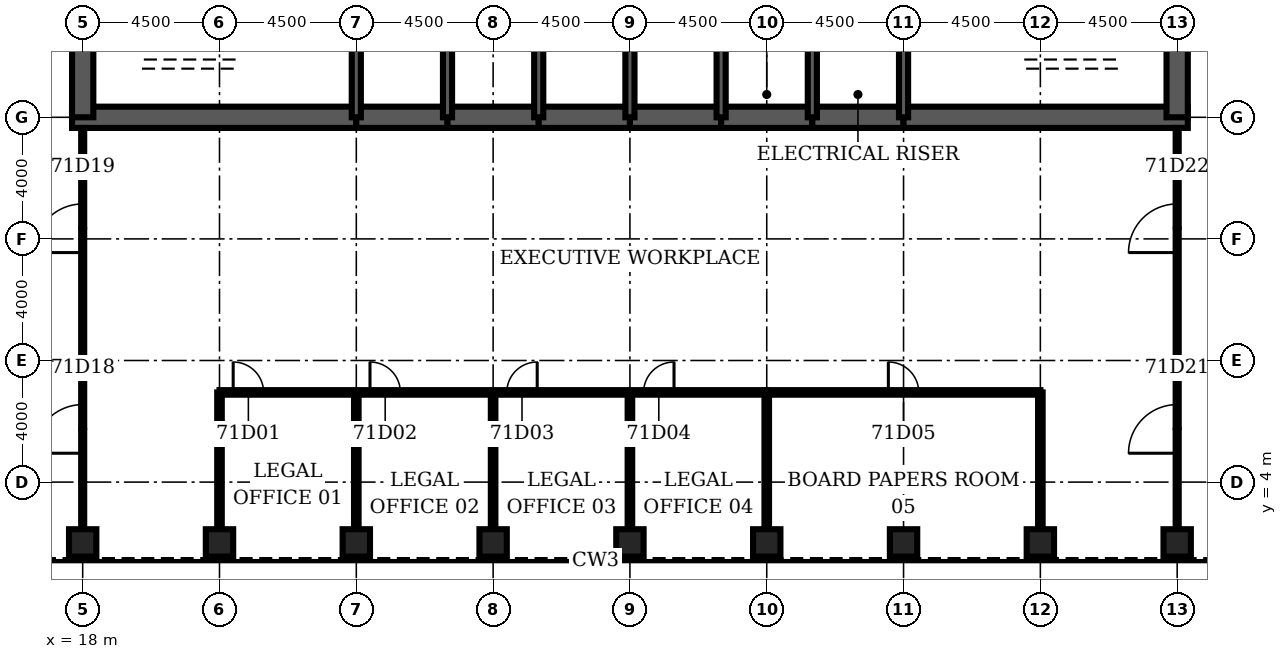
"""IFC4 building model, lengths in metres.
Left out: names, types, materials, properties, quantities, classifications, styles, units other than length and angle.
Written with IfcOpenShell. Run it as: python <this file> out.ifc"""

import sys

from ifc_helpers import new_model, si_unit, direction, frame, frame_2d, origin, origin_2d, place, context, subcontext, project, spatial, rectangle, hollow_rectangle, extrude, element, fill, save


model = new_model("IFC4")
c1 = context("Model", 3, precision=1e-05, world=origin(), true_north=direction((0.0, 1.0)))
c2 = subcontext(c1, "Body", "Model", "MODEL_VIEW")
j1 = project(units=[si_unit("LENGTHUNIT", "METRE"), si_unit("PLANEANGLEUNIT", "RADIAN")], contexts=[c1])
p1 = place(None, origin())
s1 = spatial("IfcSite", under=j1, at=p1, CompositionType="ELEMENT")
p2 = place(p1, origin())
s2 = spatial("IfcBuilding", under=s1, at=p2, CompositionType="ELEMENT")
p3 = place(p2, frame((0.0, 0.0, 313.1)))
s3 = spatial("IfcBuildingStorey", under=s2, at=p3, CompositionType="ELEMENT", Elevation=313.1)
for number, where, z_axis, x_axis in (
    (1, (18.0, 2.0, 0.0), (0.0, 0.0, 1.0), (0.0, 1.0, 0.0)),
    (2, (22.5, 2.0, 0.0), (0.0, 0.0, 1.0), (0.0, 1.0, 0.0)),
    (3, (27.0, 2.0, 0.0), (0.0, 0.0, 1.0), (0.0, 1.0, 0.0)),
    (4, (31.5, 2.0, 0.0), (0.0, 0.0, 1.0), (0.0, 1.0, 0.0)),
    (5, (36.0, 2.0, 0.0), (0.0, 0.0, 1.0), (0.0, 1.0, 0.0)),
    (6, (40.5, 2.0, 0.0), (0.0, 0.0, 1.0), (0.0, 1.0, 0.0)),
    (7, (45.0, 2.0, 0.0), (0.0, 0.0, 1.0), (0.0, 1.0, 0.0)),
    (8, (49.5, 2.0, 0.0), (0.0, 0.0, 1.0), (0.0, 1.0, 0.0)),
    (9, (54.0, 2.0, 0.0), (0.0, 0.0, 1.0), (0.0, 1.0, 0.0)),
):
    element("IfcColumn", number, at=place(p3, frame(where, z_axis=z_axis, x_axis=x_axis)), inside=s3, PredefinedType="COLUMN", context=c2, shape_type="SweptSolid", body=[
        extrude(hollow_rectangle(XDim=0.9, YDim=0.9, WallThickness=0.05, at=origin_2d()), origin(), (0.0, 0.0, 1.0), 4.2),
    ])
p4 = place(p3, frame((17.65, 16.0, 0.0), z_axis=(0.0, 0.0, 1.0), x_axis=(1.0, 0.0, 0.0)))
e10 = element("IfcWall", 10, at=p4, inside=s3, PredefinedType="SHEAR", context=c2, shape_type="SweptSolid", body=[
    extrude(rectangle(XDim=9.35, YDim=0.7, at=frame_2d((4.675, 0.0))), origin(), (0.0, 0.0, 1.0), 4.2),
])
for number, where, z_axis, x_axis in (
    (11, (27.0, 16.0, 0.0), (0.0, 0.0, 1.0), (1.0, 0.0, 0.0)),
    (12, (30.0, 16.0, 0.0), (0.0, 0.0, 1.0), (1.0, 0.0, 0.0)),
    (13, (33.0, 16.0, 0.0), (0.0, 0.0, 1.0), (1.0, 0.0, 0.0)),
    (14, (36.0, 16.0, 0.0), (0.0, 0.0, 1.0), (1.0, 0.0, 0.0)),
    (15, (39.0, 16.0, 0.0), (0.0, 0.0, 1.0), (1.0, 0.0, 0.0)),
    (16, (42.0, 16.0, 0.0), (0.0, 0.0, 1.0), (1.0, 0.0, 0.0)),
):
    element("IfcWall", number, at=place(p3, frame(where, z_axis=z_axis, x_axis=x_axis)), inside=s3, PredefinedType="SHEAR", context=c2, shape_type="SweptSolid", body=[
        extrude(rectangle(XDim=3.0, YDim=0.7, at=frame_2d((1.5, 0.0))), origin(), (0.0, 0.0, 1.0), 4.2),
    ])
p5 = place(p3, frame((45.0, 16.0, 0.0), z_axis=(0.0, 0.0, 1.0), x_axis=(1.0, 0.0, 0.0)))
e17 = element("IfcWall", 17, at=p5, inside=s3, PredefinedType="SHEAR", context=c2, shape_type="SweptSolid", body=[
    extrude(rectangle(XDim=9.35, YDim=0.7, at=frame_2d((4.675, 0.0))), origin(), (0.0, 0.0, 1.0), 4.2),
])
for number, where, z_axis, x_axis in (
    (18, (18.0, 19.2, 0.0), (0.0, 0.0, 1.0), (0.0, -1.0, 0.0)),
    (19, (54.0, 16.0, 0.0), (0.0, 0.0, 1.0), (0.0, 1.0, 0.0)),
):
    element("IfcWall", number, at=place(p3, frame(where, z_axis=z_axis, x_axis=x_axis)), inside=s3, PredefinedType="SHEAR", context=c2, shape_type="SweptSolid", body=[
        extrude(rectangle(XDim=3.2, YDim=0.7, at=frame_2d((1.6, 0.0))), origin(), (0.0, 0.0, 1.0), 4.2),
    ])
for number, where, z_axis, x_axis in (
    (20, (27.0, 16.0, 0.0), (0.0, 0.0, 1.0), (0.0, 1.0, 0.0)),
    (21, (30.0, 16.0, 0.0), (0.0, 0.0, 1.0), (0.0, 1.0, 0.0)),
    (22, (33.0, 16.0, 0.0), (0.0, 0.0, 1.0), (0.0, 1.0, 0.0)),
    (23, (36.0, 16.0, 0.0), (0.0, 0.0, 1.0), (0.0, 1.0, 0.0)),
    (24, (39.0, 16.0, 0.0), (0.0, 0.0, 1.0), (0.0, 1.0, 0.0)),
    (25, (42.0, 16.0, 0.0), (0.0, 0.0, 1.0), (0.0, 1.0, 0.0)),
    (26, (45.0, 16.0, 0.0), (0.0, 0.0, 1.0), (0.0, 1.0, 0.0)),
):
    element("IfcWall", number, at=place(p3, frame(where, z_axis=z_axis, x_axis=x_axis)), inside=s3, PredefinedType="SOLIDWALL", context=c2, shape_type="SweptSolid", body=[
        extrude(rectangle(XDim=3.2, YDim=0.3, at=frame_2d((1.6, 0.0))), origin(), (0.0, 0.0, 1.0), 4.2),
    ])
p6 = place(p3, frame((39.15, 17.3, 0.0), z_axis=(0.0, 0.0, 1.0), x_axis=(1.0, 0.0, 0.0)))
e27 = element("IfcWall", 27, at=p6, inside=s3, PredefinedType="SOLIDWALL", context=c2, shape_type="SweptSolid", body=[
    extrude(rectangle(XDim=2.7, YDim=0.3, at=frame_2d((1.35, 0.0))), origin(), (0.0, 0.0, 1.0), 4.04),
])
p7 = place(p6, frame((0.85, 0.0, 0.0)))
e28 = element("IfcOpeningElement", 28, at=p7, cuts=e27, PredefinedType="OPENING", context=c2, shape_type="SweptSolid", body=[
    extrude(rectangle(XDim=1.0, YDim=2.1, at=frame_2d((0.5, 1.05))), frame((0.0, 0.16, 0.0), z_axis=(0.0, -1.0, 0.0), x_axis=(1.0, 0.0, 0.0)), (0.0, 0.0, 1.0), 0.32),
])
p8 = place(p3, frame((42.15, 17.3, 0.0), z_axis=(0.0, 0.0, 1.0), x_axis=(1.0, 0.0, 0.0)))
e29 = element("IfcWall", 29, at=p8, inside=s3, PredefinedType="SOLIDWALL", context=c2, shape_type="SweptSolid", body=[
    extrude(rectangle(XDim=2.7, YDim=0.3, at=frame_2d((1.35, 0.0))), origin(), (0.0, 0.0, 1.0), 4.04),
])
p9 = place(p8, frame((0.85, 0.0, 0.0)))
e30 = element("IfcOpeningElement", 30, at=p9, cuts=e29, PredefinedType="OPENING", context=c2, shape_type="SweptSolid", body=[
    extrude(rectangle(XDim=1.0, YDim=2.1, at=frame_2d((0.5, 1.05))), frame((0.0, 0.16, 0.0), z_axis=(0.0, -1.0, 0.0), x_axis=(1.0, 0.0, 0.0)), (0.0, 0.0, 1.0), 0.32),
])
p10 = place(p3, frame((22.5, 6.95, 0.0), z_axis=(0.0, 0.0, 1.0), x_axis=(1.0, 0.0, 0.0)))
e31 = element("IfcWall", 31, at=p10, inside=s3, PredefinedType="PARTITIONING", context=c2, shape_type="SweptSolid", body=[
    extrude(rectangle(XDim=18.0, YDim=0.15, at=frame_2d((9.0, 0.0))), origin(), (0.0, 0.0, 1.0), 3.0),
])
p11 = place(p10, frame((0.45, 0.0, 0.0)))
e32 = element("IfcOpeningElement", 32, at=p11, cuts=e31, PredefinedType="OPENING", context=c2, shape_type="SweptSolid", body=[
    extrude(rectangle(XDim=1.0, YDim=2.1, at=frame_2d((0.5, 1.05))), frame((0.0, 0.085, 0.0), z_axis=(0.0, -1.0, 0.0), x_axis=(1.0, 0.0, 0.0)), (0.0, 0.0, 1.0), 0.17),
])
p12 = place(p10, frame((4.95, 0.0, 0.0)))
e33 = element("IfcOpeningElement", 33, at=p12, cuts=e31, PredefinedType="OPENING", context=c2, shape_type="SweptSolid", body=[
    extrude(rectangle(XDim=1.0, YDim=2.1, at=frame_2d((0.5, 1.05))), frame((0.0, 0.085, 0.0), z_axis=(0.0, -1.0, 0.0), x_axis=(1.0, 0.0, 0.0)), (0.0, 0.0, 1.0), 0.17),
])
p13 = place(p10, frame((9.45, 0.0, 0.0)))
e34 = element("IfcOpeningElement", 34, at=p13, cuts=e31, PredefinedType="OPENING", context=c2, shape_type="SweptSolid", body=[
    extrude(rectangle(XDim=1.0, YDim=2.1, at=frame_2d((0.5, 1.05))), frame((0.0, 0.085, 0.0), z_axis=(0.0, -1.0, 0.0), x_axis=(1.0, 0.0, 0.0)), (0.0, 0.0, 1.0), 0.17),
])
p14 = place(p10, frame((13.95, 0.0, 0.0)))
e35 = element("IfcOpeningElement", 35, at=p14, cuts=e31, PredefinedType="OPENING", context=c2, shape_type="SweptSolid", body=[
    extrude(rectangle(XDim=1.0, YDim=2.1, at=frame_2d((0.5, 1.05))), frame((0.0, 0.085, 0.0), z_axis=(0.0, -1.0, 0.0), x_axis=(1.0, 0.0, 0.0)), (0.0, 0.0, 1.0), 0.17),
])
p15 = place(p3, frame((40.5, 6.95, 0.0), z_axis=(0.0, 0.0, 1.0), x_axis=(1.0, 0.0, 0.0)))
e36 = element("IfcWall", 36, at=p15, inside=s3, PredefinedType="PARTITIONING", context=c2, shape_type="SweptSolid", body=[
    extrude(rectangle(XDim=9.0, YDim=0.15, at=frame_2d((4.5, 0.0))), origin(), (0.0, 0.0, 1.0), 3.0),
])
p16 = place(p15, frame((4.0, 0.0, 0.0)))
e37 = element("IfcOpeningElement", 37, at=p16, cuts=e36, PredefinedType="OPENING", context=c2, shape_type="SweptSolid", body=[
    extrude(rectangle(XDim=1.0, YDim=2.1, at=frame_2d((0.5, 1.05))), frame((0.0, 0.085, 0.0), z_axis=(0.0, -1.0, 0.0), x_axis=(1.0, 0.0, 0.0)), (0.0, 0.0, 1.0), 0.17),
])
p17 = place(p3, frame((18.0, 2.45, 0.0), z_axis=(0.0, 0.0, 1.0), x_axis=(0.0, 1.0, 0.0)))
e38 = element("IfcWall", 38, at=p17, inside=s3, PredefinedType="PARTITIONING", context=c2, shape_type="SweptSolid", body=[
    extrude(rectangle(XDim=13.2, YDim=0.1, at=frame_2d((6.6, 0.0))), origin(), (0.0, 0.0, 1.0), 3.0),
])
p18 = place(p17, frame((2.5, 0.0, 0.0)))
e39 = element("IfcOpeningElement", 39, at=p18, cuts=e38, PredefinedType="OPENING", context=c2, shape_type="SweptSolid", body=[
    extrude(rectangle(XDim=1.6, YDim=2.1, at=frame_2d((0.8, 1.05))), frame((0.0, 0.06, 0.0), z_axis=(0.0, -1.0, 0.0), x_axis=(1.0, 0.0, 0.0)), (0.0, 0.0, 1.0), 0.12),
])
p19 = place(p17, frame((9.1, 0.0, 0.0)))
e40 = element("IfcOpeningElement", 40, at=p19, cuts=e38, PredefinedType="OPENING", context=c2, shape_type="SweptSolid", body=[
    extrude(rectangle(XDim=1.6, YDim=2.1, at=frame_2d((0.8, 1.05))), frame((0.0, 0.06, 0.0), z_axis=(0.0, -1.0, 0.0), x_axis=(1.0, 0.0, 0.0)), (0.0, 0.0, 1.0), 0.12),
])
for number, where, z_axis, x_axis in (
    (41, (22.5, 2.45, 0.0), (0.0, 0.0, 1.0), (0.0, 1.0, 0.0)),
    (42, (27.0, 2.45, 0.0), (0.0, 0.0, 1.0), (0.0, 1.0, 0.0)),
    (43, (31.5, 2.45, 0.0), (0.0, 0.0, 1.0), (0.0, 1.0, 0.0)),
    (44, (36.0, 2.45, 0.0), (0.0, 0.0, 1.0), (0.0, 1.0, 0.0)),
    (45, (40.5, 2.45, 0.0), (0.0, 0.0, 1.0), (0.0, 1.0, 0.0)),
    (46, (49.5, 2.45, 0.0), (0.0, 0.0, 1.0), (0.0, 1.0, 0.0)),
):
    element("IfcWall", number, at=place(p3, frame(where, z_axis=z_axis, x_axis=x_axis)), inside=s3, PredefinedType="PARTITIONING", context=c2, shape_type="SweptSolid", body=[
        extrude(rectangle(XDim=4.5, YDim=0.15, at=frame_2d((2.25, 0.0))), origin(), (0.0, 0.0, 1.0), 3.0),
    ])
p20 = place(p3, frame((54.0, 2.45, 0.0), z_axis=(0.0, 0.0, 1.0), x_axis=(0.0, 1.0, 0.0)))
e47 = element("IfcWall", 47, at=p20, inside=s3, PredefinedType="PARTITIONING", context=c2, shape_type="SweptSolid", body=[
    extrude(rectangle(XDim=13.2, YDim=0.1, at=frame_2d((6.6, 0.0))), origin(), (0.0, 0.0, 1.0), 3.0),
])
p21 = place(p20, frame((2.5, 0.0, 0.0)))
e48 = element("IfcOpeningElement", 48, at=p21, cuts=e47, PredefinedType="OPENING", context=c2, shape_type="SweptSolid", body=[
    extrude(rectangle(XDim=1.6, YDim=2.1, at=frame_2d((0.8, 1.05))), frame((0.0, 0.06, 0.0), z_axis=(0.0, -1.0, 0.0), x_axis=(1.0, 0.0, 0.0)), (0.0, 0.0, 1.0), 0.12),
])
p22 = place(p20, frame((9.1, 0.0, 0.0)))
e49 = element("IfcOpeningElement", 49, at=p22, cuts=e47, PredefinedType="OPENING", context=c2, shape_type="SweptSolid", body=[
    extrude(rectangle(XDim=1.6, YDim=2.1, at=frame_2d((0.8, 1.05))), frame((0.0, 0.06, 0.0), z_axis=(0.0, -1.0, 0.0), x_axis=(1.0, 0.0, 0.0)), (0.0, 0.0, 1.0), 0.12),
])
p23 = place(p7, origin())
e50 = element("IfcDoor", 50, at=p23, inside=s3, OperationType="SINGLE_SWING_LEFT", PredefinedType="DOOR", context=c2, shape_type="SweptSolid", body=[
    extrude(rectangle(XDim=1.0, YDim=2.1, at=frame_2d((0.5, 1.05))), frame((0.0, 0.025, 0.0), z_axis=(0.0, -1.0, 0.0), x_axis=(1.0, 0.0, 0.0)), (0.0, 0.0, 1.0), 0.05),
])
fill(e28, e50)
p24 = place(p9, origin())
e51 = element("IfcDoor", 51, at=p24, inside=s3, OperationType="SINGLE_SWING_LEFT", PredefinedType="DOOR", context=c2, shape_type="SweptSolid", body=[
    extrude(rectangle(XDim=1.0, YDim=2.1, at=frame_2d((0.5, 1.05))), frame((0.0, 0.025, 0.0), z_axis=(0.0, -1.0, 0.0), x_axis=(1.0, 0.0, 0.0)), (0.0, 0.0, 1.0), 0.05),
])
fill(e30, e51)
p25 = place(p11, origin())
e52 = element("IfcDoor", 52, at=p25, inside=s3, OperationType="SINGLE_SWING_LEFT", PredefinedType="DOOR", context=c2, shape_type="SweptSolid", body=[
    extrude(rectangle(XDim=1.0, YDim=2.1, at=frame_2d((0.5, 1.05))), frame((0.0, 0.025, 0.0), z_axis=(0.0, -1.0, 0.0), x_axis=(1.0, 0.0, 0.0)), (0.0, 0.0, 1.0), 0.05),
])
fill(e32, e52)
p26 = place(p12, origin())
e53 = element("IfcDoor", 53, at=p26, inside=s3, OperationType="SINGLE_SWING_LEFT", PredefinedType="DOOR", context=c2, shape_type="SweptSolid", body=[
    extrude(rectangle(XDim=1.0, YDim=2.1, at=frame_2d((0.5, 1.05))), frame((0.0, 0.025, 0.0), z_axis=(0.0, -1.0, 0.0), x_axis=(1.0, 0.0, 0.0)), (0.0, 0.0, 1.0), 0.05),
])
fill(e33, e53)
p27 = place(p13, origin())
e54 = element("IfcDoor", 54, at=p27, inside=s3, OperationType="SINGLE_SWING_RIGHT", PredefinedType="DOOR", context=c2, shape_type="SweptSolid", body=[
    extrude(rectangle(XDim=1.0, YDim=2.1, at=frame_2d((0.5, 1.05))), frame((0.0, 0.025, 0.0), z_axis=(0.0, -1.0, 0.0), x_axis=(1.0, 0.0, 0.0)), (0.0, 0.0, 1.0), 0.05),
])
fill(e34, e54)
p28 = place(p14, origin())
e55 = element("IfcDoor", 55, at=p28, inside=s3, OperationType="SINGLE_SWING_RIGHT", PredefinedType="DOOR", context=c2, shape_type="SweptSolid", body=[
    extrude(rectangle(XDim=1.0, YDim=2.1, at=frame_2d((0.5, 1.05))), frame((0.0, 0.025, 0.0), z_axis=(0.0, -1.0, 0.0), x_axis=(1.0, 0.0, 0.0)), (0.0, 0.0, 1.0), 0.05),
])
fill(e35, e55)
p29 = place(p16, origin())
e56 = element("IfcDoor", 56, at=p29, inside=s3, OperationType="SINGLE_SWING_LEFT", PredefinedType="DOOR", context=c2, shape_type="SweptSolid", body=[
    extrude(rectangle(XDim=1.0, YDim=2.1, at=frame_2d((0.5, 1.05))), frame((0.0, 0.025, 0.0), z_axis=(0.0, -1.0, 0.0), x_axis=(1.0, 0.0, 0.0)), (0.0, 0.0, 1.0), 0.05),
])
fill(e37, e56)
p30 = place(p18, origin())
e57 = element("IfcDoor", 57, at=p30, inside=s3, OperationType="SINGLE_SWING_LEFT", PredefinedType="DOOR", context=c2, shape_type="SweptSolid", body=[
    extrude(rectangle(XDim=1.6, YDim=2.1, at=frame_2d((0.8, 1.05))), frame((0.0, 0.025, 0.0), z_axis=(0.0, -1.0, 0.0), x_axis=(1.0, 0.0, 0.0)), (0.0, 0.0, 1.0), 0.05),
])
fill(e39, e57)
p31 = place(p19, origin())
e58 = element("IfcDoor", 58, at=p31, inside=s3, OperationType="SINGLE_SWING_LEFT", PredefinedType="DOOR", context=c2, shape_type="SweptSolid", body=[
    extrude(rectangle(XDim=1.6, YDim=2.1, at=frame_2d((0.8, 1.05))), frame((0.0, 0.025, 0.0), z_axis=(0.0, -1.0, 0.0), x_axis=(1.0, 0.0, 0.0)), (0.0, 0.0, 1.0), 0.05),
])
fill(e40, e58)
p32 = place(p21, origin())
e59 = element("IfcDoor", 59, at=p32, inside=s3, OperationType="SINGLE_SWING_LEFT", PredefinedType="DOOR", context=c2, shape_type="SweptSolid", body=[
    extrude(rectangle(XDim=1.6, YDim=2.1, at=frame_2d((0.8, 1.05))), frame((0.0, 0.025, 0.0), z_axis=(0.0, -1.0, 0.0), x_axis=(1.0, 0.0, 0.0)), (0.0, 0.0, 1.0), 0.05),
])
fill(e48, e59)
p33 = place(p22, origin())
e60 = element("IfcDoor", 60, at=p33, inside=s3, OperationType="SINGLE_SWING_LEFT", PredefinedType="DOOR", context=c2, shape_type="SweptSolid", body=[
    extrude(rectangle(XDim=1.6, YDim=2.1, at=frame_2d((0.8, 1.05))), frame((0.0, 0.025, 0.0), z_axis=(0.0, -1.0, 0.0), x_axis=(1.0, 0.0, 0.0)), (0.0, 0.0, 1.0), 0.05),
])
fill(e49, e60)
save(model, sys.argv[1])
